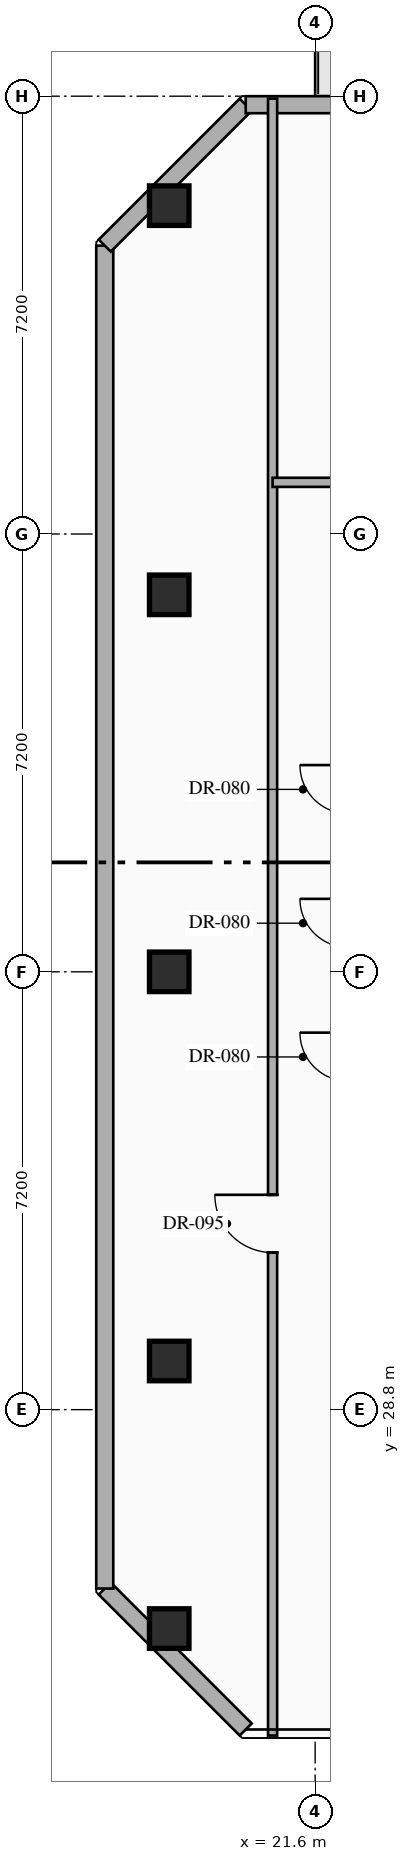
"""IFC4 building model, lengths in metres.
Left out: names, types, materials, properties, quantities, classifications, styles, units other than length and angle.
Written with IfcOpenShell. Run it as: python <this file> out.ifc"""

import sys

from ifc_helpers import new_model, si_unit, direction, frame, frame_2d, origin, origin_2d, place, context, subcontext, project, spatial, rectangle, hollow_rectangle, extrude, element, fill, save


model = new_model("IFC4")
c1 = context("Model", 3, precision=1e-05, world=origin(), true_north=direction((0.0, 1.0)))
c2 = subcontext(c1, "Body", "Model", "MODEL_VIEW")
j1 = project(units=[si_unit("LENGTHUNIT", "METRE"), si_unit("PLANEANGLEUNIT", "RADIAN")], contexts=[c1])
p1 = place(None, origin())
s1 = spatial("IfcSite", under=j1, at=p1, CompositionType="ELEMENT")
p2 = place(p1, origin())
s2 = spatial("IfcBuilding", under=s1, at=p2, CompositionType="ELEMENT")
p3 = place(p2, frame((0.0, 0.0, 250.35)))
s3 = spatial("IfcBuildingStorey", under=s2, at=p3, CompositionType="ELEMENT", Elevation=250.35)
for number, where, z_axis, x_axis in (
    (1, (19.2, 48.6, 0.0), (0.0, 0.0, 1.0), (1.0, 0.0, 0.0)),
    (2, (19.2, 25.2, 0.0), (0.0, 0.0, 1.0), (1.0, 0.0, 0.0)),
    (3, (19.2, 29.6, 0.0), (0.0, 0.0, 1.0), (1.0, 0.0, 0.0)),
    (4, (19.2, 42.2, 0.0), (0.0, 0.0, 1.0), (1.0, 0.0, 0.0)),
    (5, (19.2, 36.0, 0.0), (0.0, 0.0, 1.0), (1.0, 0.0, 0.0)),
):
    element("IfcColumn", number, at=place(p3, frame(where, z_axis=z_axis, x_axis=x_axis)), inside=s3, PredefinedType="COLUMN", context=c2, shape_type="SweptSolid", body=[
        extrude(hollow_rectangle(XDim=0.65, YDim=0.65, WallThickness=0.025, at=origin_2d()), origin(), (0.0, 0.0, 1.0), 3.6),
    ])
p4 = place(p3, frame((20.458, 23.54, 0.0), z_axis=(0.0, 0.0, 1.0), x_axis=(-0.707144017911, 0.707069542501, 0.0)))
e6 = element("IfcWall", 6, at=p4, inside=s3, PredefinedType="STANDARD", context=c2, shape_type="SweptSolid", body=[
    extrude(rectangle(XDim=3.278, YDim=0.28, at=frame_2d((1.639, 0.0))), origin(), (0.0, 0.0, 1.0), 3.35),
])
p5 = place(p3, frame((18.14, 25.858, 0.0), z_axis=(0.0, 0.0, 1.0), x_axis=(0.0, 1.0, 0.0)))
e7 = element("IfcWall", 7, at=p5, inside=s3, PredefinedType="STANDARD", context=c2, shape_type="SweptSolid", body=[
    extrude(rectangle(XDim=22.084, YDim=0.28, at=frame_2d((11.042, 0.0))), origin(), (0.0, 0.0, 1.0), 3.35),
])
p6 = place(p3, frame((18.14, 47.942, 0.0), z_axis=(0.0, 0.0, 1.0), x_axis=(0.707106781187, 0.707106781187, 0.0)))
e8 = element("IfcWall", 8, at=p6, inside=s3, PredefinedType="STANDARD", context=c2, shape_type="SweptSolid", body=[
    extrude(rectangle(XDim=3.278, YDim=0.28, at=frame_2d((1.639, 0.0))), origin(), (0.0, 0.0, 1.0), 3.35),
])
p7 = place(p3, frame((20.458, 50.26, 0.0), z_axis=(0.0, 0.0, 1.0), x_axis=(1.0, 0.0, 0.0)))
e9 = element("IfcWall", 9, at=p7, inside=s3, PredefinedType="STANDARD", context=c2, shape_type="SweptSolid", body=[
    extrude(rectangle(XDim=22.084, YDim=0.28, at=frame_2d((11.042, 0.0))), origin(), (0.0, 0.0, 1.0), 3.35),
])
p8 = place(p7, frame((2.1, 0.0, 0.0)))
e10 = element("IfcOpeningElement", 10, at=p8, cuts=e9, PredefinedType="OPENING", context=c2, shape_type="SweptSolid", body=[
    extrude(rectangle(XDim=1.1, YDim=2.2, at=frame_2d((0.55, 1.1))), frame((0.0, 0.15, 0.0), z_axis=(0.0, -1.0, 0.0), x_axis=(1.0, 0.0, 0.0)), (0.0, 0.0, 1.0), 0.3),
])
p9 = place(p7, frame((15.663, 0.0, 0.85)))
e11 = element("IfcOpeningElement", 11, at=p9, cuts=e9, PredefinedType="OPENING", context=c2, shape_type="SweptSolid", body=[
    extrude(rectangle(XDim=1.8, YDim=2.1, at=frame_2d((0.9, 1.05))), frame((0.0, 0.15, 0.0), z_axis=(0.0, -1.0, 0.0), x_axis=(1.0, 0.0, 0.0)), (0.0, 0.0, 1.0), 0.3),
])
p10 = place(p3, frame((20.9, 23.44, 0.0), z_axis=(0.0, 0.0, 1.0), x_axis=(0.0, 1.0, 0.0)))
e12 = element("IfcWall", 12, at=p10, inside=s3, PredefinedType="PARTITIONING", context=c2, shape_type="SweptSolid", body=[
    extrude(rectangle(XDim=26.92, YDim=0.15, at=frame_2d((13.46, 0.0))), origin(), (0.0, 0.0, 1.0), 3.35),
])
p11 = place(p10, frame((7.943, 0.0, 0.0)))
e13 = element("IfcOpeningElement", 13, at=p11, cuts=e12, PredefinedType="OPENING", context=c2, shape_type="SweptSolid", body=[
    extrude(rectangle(XDim=0.95, YDim=2.15, at=frame_2d((0.475, 1.075))), frame((0.0, 0.085, 0.0), z_axis=(0.0, -1.0, 0.0), x_axis=(1.0, 0.0, 0.0)), (0.0, 0.0, 1.0), 0.17),
])
p12 = place(p3, frame((20.9, 44.05, 0.0), z_axis=(0.0, 0.0, 1.0), x_axis=(1.0, 0.0, 0.0)))
e14 = element("IfcWall", 14, at=p12, inside=s3, PredefinedType="PARTITIONING", context=c2, shape_type="SweptSolid", body=[
    extrude(rectangle(XDim=24.06, YDim=0.15, at=frame_2d((12.03, 0.0))), origin(), (0.0, 0.0, 1.0), 3.35),
])
p13 = place(p12, frame((14.908, 0.0, 0.0)))
e15 = element("IfcOpeningElement", 15, at=p13, cuts=e14, PredefinedType="OPENING", context=c2, shape_type="SweptSolid", body=[
    extrude(rectangle(XDim=0.95, YDim=2.15, at=frame_2d((0.475, 1.075))), frame((0.0, 0.085, 0.0), z_axis=(0.0, -1.0, 0.0), x_axis=(1.0, 0.0, 0.0)), (0.0, 0.0, 1.0), 0.17),
])
p14 = place(p11, origin())
e16 = element("IfcDoor", 16, at=p14, inside=s3, OperationType="SINGLE_SWING_RIGHT", PredefinedType="DOOR", context=c2, shape_type="SweptSolid", body=[
    extrude(rectangle(XDim=0.95, YDim=2.15, at=frame_2d((0.475, 1.075))), frame((0.0, 0.025, 0.0), z_axis=(0.0, -1.0, 0.0), x_axis=(1.0, 0.0, 0.0)), (0.0, 0.0, 1.0), 0.05),
])
fill(e13, e16)
save(model, sys.argv[1])
